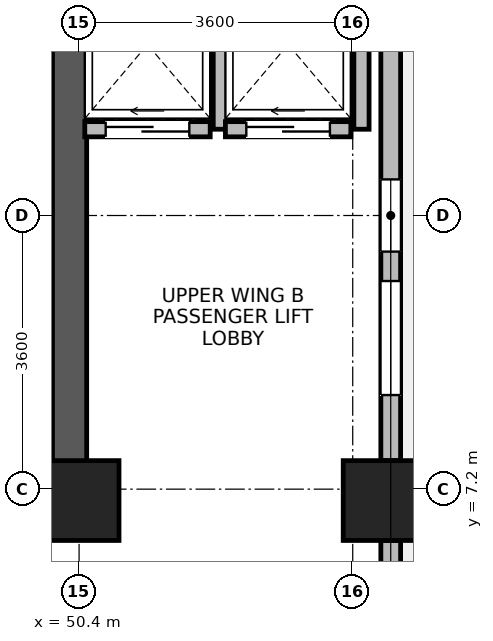
"""IFC4 building model, lengths in metres.
Left out: names, types, materials, properties, quantities, classifications, styles, units other than length and angle.
Written with IfcOpenShell. Run it as: python <this file> out.ifc"""

import sys

from ifc_helpers import new_model, si_unit, direction, frame, frame_2d, origin, origin_2d, place, context, subcontext, project, spatial, rectangle, extrude, source, transform, mapped, element, fill, save


model = new_model("IFC4")
c1 = context("Model", 3, precision=1e-05, world=origin(), true_north=direction((0.0, 1.0)))
c2 = subcontext(c1, "Body", "Model", "MODEL_VIEW")
j1 = project(units=[si_unit("LENGTHUNIT", "METRE"), si_unit("PLANEANGLEUNIT", "RADIAN")], contexts=[c1])
p1 = place(None, origin())
s1 = spatial("IfcSite", under=j1, at=p1, CompositionType="ELEMENT")
p2 = place(p1, origin())
s2 = spatial("IfcBuilding", under=s1, at=p2, CompositionType="ELEMENT")
p3 = place(p2, frame((0.0, 0.0, 166.1)))
s3 = spatial("IfcBuildingStorey", under=s2, at=p3, CompositionType="ELEMENT", Elevation=166.1)
p4 = place(p3, frame((50.275, 6.85, 0.0), z_axis=(0.0, 0.0, 1.0), x_axis=(0.0, 1.0, 0.0)))
e1 = element("IfcWall", 1, at=p4, inside=s3, PredefinedType="SHEAR", context=c2, shape_type="SweptSolid", body=[
    extrude(rectangle(XDim=7.9, YDim=0.45, at=frame_2d((3.95, 0.0))), origin(), (0.0, 0.0, 1.0), 3.46),
])
p5 = place(p3, frame((46.85, 7.075, 0.0), z_axis=(0.0, 0.0, 1.0), x_axis=(1.0, 0.0, 0.0)))
e2 = element("IfcWall", 2, at=p5, inside=s3, PredefinedType="SHEAR", context=c2, shape_type="SweptSolid", body=[
    extrude(rectangle(XDim=3.2, YDim=0.45, at=frame_2d((1.6, 0.0))), origin(), (0.0, 0.0, 1.0), 3.46),
])
m1 = source(origin(), c2, "Body", "SweptSolid", [
    extrude(rectangle(XDim=1.05, YDim=1.05, at=origin_2d()), origin(), (0.0, 0.0, 1.0), 3.7),
])
for number, where, z_axis, x_axis in (
    (3, (50.4, 7.05, 0.0), (0.0, 0.0, 1.0), (1.0, 0.0, 0.0)),
    (4, (54.4, 7.05, 0.0), (0.0, 0.0, 1.0), (1.0, 0.0, 0.0)),
):
    element("IfcColumn", number, at=place(p3, frame(where, z_axis=z_axis, x_axis=x_axis)), inside=s3, PredefinedType="COLUMN", context=c2, shape_type="MappedRepresentation", body=[
        mapped(m1, transform((0.0, 0.0, 0.0), x_axis=(1.0, 0.0, 0.0), y_axis=(0.0, 1.0, 0.0), z_axis=(0.0, 0.0, 1.0), scale=1.0)),
    ])
p6 = place(p3, frame((54.5, 6.524, 0.0), z_axis=(0.0, 0.0, 1.0), x_axis=(0.0, -1.0, 0.0)))
e5 = element("IfcWall", 5, at=p6, inside=s3, PredefinedType="STANDARD", context=c2, shape_type="SweptSolid", body=[
    extrude(rectangle(XDim=1.854, YDim=0.26, at=frame_2d((0.927, 0.0))), origin(), (0.0, 0.0, 1.0), 3.44),
])
p7 = place(p3, frame((54.5, 14.024, 0.0), z_axis=(0.0, 0.0, 1.0), x_axis=(0.0, -1.0, 0.0)))
e6 = element("IfcWall", 6, at=p7, inside=s3, PredefinedType="STANDARD", context=c2, shape_type="SweptSolid", body=[
    extrude(rectangle(XDim=6.448, YDim=0.26, at=frame_2d((3.224, 0.0))), origin(), (0.0, 0.0, 1.0), 2.99),
])
p8 = place(p7, frame((4.086, 0.0, 0.85)))
e7 = element("IfcOpeningElement", 7, at=p8, cuts=e6, PredefinedType="OPENING", context=c2, shape_type="SweptSolid", body=[
    extrude(rectangle(XDim=1.5, YDim=1.85, at=frame_2d((0.75, 0.925))), frame((0.0, 0.14, 0.0), z_axis=(0.0, -1.0, 0.0), x_axis=(1.0, 0.0, 0.0)), (0.0, 0.0, 1.0), 0.28),
])
p9 = place(p7, frame((2.749, 0.0, 0.85)))
e8 = element("IfcOpeningElement", 8, at=p9, cuts=e6, PredefinedType="OPENING", context=c2, shape_type="SweptSolid", body=[
    extrude(rectangle(XDim=0.95, YDim=1.75, at=frame_2d((0.475, 0.875))), frame((0.0, 0.14, 0.0), z_axis=(0.0, -1.0, 0.0), x_axis=(1.0, 0.0, 0.0)), (0.0, 0.0, 1.0), 0.28),
])
p10 = place(p3, frame((50.475, 11.935, 0.0), z_axis=(0.0, 0.0, 1.0), x_axis=(1.0, 0.0, 0.0)))
e9 = element("IfcWall", 9, at=p10, inside=s3, PredefinedType="PARTITIONING", context=c2, shape_type="SweptSolid", body=[
    extrude(rectangle(XDim=1.65, YDim=0.2, at=frame_2d((0.825, 0.0))), origin(), (0.0, 0.0, 1.0), 3.44),
])
p11 = place(p10, frame((0.275, 0.0, 0.0)))
e10 = element("IfcOpeningElement", 10, at=p11, cuts=e9, PredefinedType="OPENING", context=c2, shape_type="SweptSolid", body=[
    extrude(rectangle(XDim=1.1, YDim=2.12, at=frame_2d((0.55, 1.06))), frame((0.0, 0.11, 0.0), z_axis=(0.0, -1.0, 0.0), x_axis=(1.0, 0.0, 0.0)), (0.0, 0.0, 1.0), 0.22),
])
p12 = place(p3, frame((52.265, 11.935, 0.0), z_axis=(0.0, 0.0, 1.0), x_axis=(0.0, 1.0, 0.0)))
e11 = element("IfcWall", 11, at=p12, inside=s3, PredefinedType="PARTITIONING", context=c2, shape_type="SweptSolid", body=[
    extrude(rectangle(XDim=2.23, YDim=0.2, at=frame_2d((1.115, 0.0))), origin(), (0.0, 0.0, 1.0), 3.44),
])
p13 = place(p3, frame((52.325, 11.935, 0.0), z_axis=(0.0, 0.0, 1.0), x_axis=(1.0, 0.0, 0.0)))
e12 = element("IfcWall", 12, at=p13, inside=s3, PredefinedType="PARTITIONING", context=c2, shape_type="SweptSolid", body=[
    extrude(rectangle(XDim=1.65, YDim=0.2, at=frame_2d((0.825, 0.0))), origin(), (0.0, 0.0, 1.0), 3.44),
])
p14 = place(p13, frame((0.275, 0.0, 0.0)))
e13 = element("IfcOpeningElement", 13, at=p14, cuts=e12, PredefinedType="OPENING", context=c2, shape_type="SweptSolid", body=[
    extrude(rectangle(XDim=1.1, YDim=2.12, at=frame_2d((0.55, 1.06))), frame((0.0, 0.11, 0.0), z_axis=(0.0, -1.0, 0.0), x_axis=(1.0, 0.0, 0.0)), (0.0, 0.0, 1.0), 0.22),
])
p15 = place(p3, frame((54.115, 11.935, 0.0), z_axis=(0.0, 0.0, 1.0), x_axis=(0.0, 1.0, 0.0)))
e14 = element("IfcWall", 14, at=p15, inside=s3, PredefinedType="PARTITIONING", context=c2, shape_type="SweptSolid", body=[
    extrude(rectangle(XDim=2.23, YDim=0.2, at=frame_2d((1.115, 0.0))), origin(), (0.0, 0.0, 1.0), 2.99),
])
p16 = place(p8, origin())
e15 = element("IfcWindow", 15, at=p16, inside=s3, PartitioningType="SINGLE_PANEL", PredefinedType="WINDOW", context=c2, shape_type="SweptSolid", body=[
    extrude(rectangle(XDim=1.5, YDim=1.85, at=frame_2d((0.75, 0.925))), frame((0.0, 0.03, 0.0), z_axis=(0.0, -1.0, 0.0), x_axis=(1.0, 0.0, 0.0)), (0.0, 0.0, 1.0), 0.06),
])
fill(e7, e15)
p17 = place(p9, origin())
e16 = element("IfcWindow", 16, at=p17, inside=s3, PartitioningType="SINGLE_PANEL", PredefinedType="WINDOW", context=c2, shape_type="SweptSolid", body=[
    extrude(rectangle(XDim=0.95, YDim=1.75, at=frame_2d((0.475, 0.875))), frame((0.0, 0.03, 0.0), z_axis=(0.0, -1.0, 0.0), x_axis=(1.0, 0.0, 0.0)), (0.0, 0.0, 1.0), 0.06),
])
fill(e8, e16)
p18 = place(p11, origin())
e17 = element("IfcDoor", 17, at=p18, inside=s3, OperationType="SLIDING_TO_LEFT", PredefinedType="DOOR", context=c2, shape_type="SweptSolid", body=[
    extrude(rectangle(XDim=1.1, YDim=2.12, at=frame_2d((0.55, 1.06))), frame((0.0, 0.025, 0.0), z_axis=(0.0, -1.0, 0.0), x_axis=(1.0, 0.0, 0.0)), (0.0, 0.0, 1.0), 0.05),
])
fill(e10, e17)
p19 = place(p14, origin())
e18 = element("IfcDoor", 18, at=p19, inside=s3, OperationType="SLIDING_TO_LEFT", PredefinedType="DOOR", context=c2, shape_type="SweptSolid", body=[
    extrude(rectangle(XDim=1.1, YDim=2.12, at=frame_2d((0.55, 1.06))), frame((0.0, 0.025, 0.0), z_axis=(0.0, -1.0, 0.0), x_axis=(1.0, 0.0, 0.0)), (0.0, 0.0, 1.0), 0.05),
])
fill(e13, e18)
save(model, sys.argv[1])
